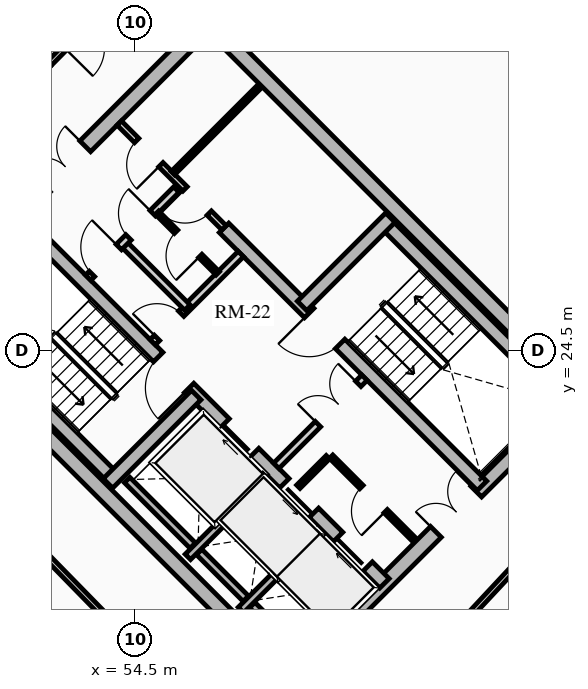
"""IFC4 building model, lengths in metres.
Left out: names, types, materials, properties, quantities, classifications, styles, units other than length and angle.
Written with IfcOpenShell. Run it as: python <this file> out.ifc"""

import sys

from ifc_helpers import new_model, si_unit, direction, frame, frame_2d, origin, place, context, subcontext, project, spatial, rectangle, extrude, source, transform, mapped, element, fill, save


model = new_model("IFC4")
c1 = context("Model", 3, precision=1e-05, world=origin(), true_north=direction((0.0, 1.0)))
c2 = subcontext(c1, "Body", "Model", "MODEL_VIEW")
j1 = project(units=[si_unit("LENGTHUNIT", "METRE"), si_unit("PLANEANGLEUNIT", "RADIAN")], contexts=[c1])
p1 = place(None, origin())
s1 = spatial("IfcSite", under=j1, at=p1, CompositionType="ELEMENT")
p2 = place(p1, origin())
s2 = spatial("IfcBuilding", under=s1, at=p2, CompositionType="ELEMENT")
p3 = place(p2, frame((0.0, 0.0, 219.94)))
s3 = spatial("IfcBuildingStorey", under=s2, at=p3, CompositionType="ELEMENT", Elevation=219.94)
for number, where, z_axis, x_axis in (
    (1, (58.702, 15.732, 0.0), (0.0, 0.0, 1.0), (-0.707, 0.707, 0.0)),
    (2, (66.268, 23.298, 0.0), (0.0, 0.0, 1.0), (-0.707, 0.707, 0.0)),
):
    element("IfcWall", number, at=place(p3, frame(where, z_axis=z_axis, x_axis=x_axis)), inside=s3, PredefinedType="SHEAR", context=c2, shape_type="SweptSolid", body=[
        extrude(rectangle(XDim=14.1, YDim=0.4, at=frame_2d((7.05, 0.0))), origin(), (0.0, 0.0, 1.0), 2.91),
    ])
p4 = place(p3, frame((58.561, 15.873, 0.0), z_axis=(0.0, 0.0, 1.0), x_axis=(0.707106781187, 0.707106781187, 0.0)))
e3 = element("IfcWall", 3, at=p4, inside=s3, PredefinedType="SHEAR", context=c2, shape_type="SweptSolid", body=[
    extrude(rectangle(XDim=10.7, YDim=0.4, at=frame_2d((5.35, 0.0))), origin(), (0.0, 0.0, 1.0), 2.91),
])
m1 = source(origin(), c2, "Body", "SweptSolid", [
    extrude(rectangle(XDim=1.5, YDim=2.02, at=frame_2d((0.75, 1.01))), frame((0.0, 0.21, 0.0), z_axis=(0.0, -1.0, 0.0), x_axis=(1.0, 0.0, 0.0)), (0.0, 0.0, 1.0), 0.42),
])
p5 = place(p4, frame((5.45, 0.0, 0.0)))
e4 = element("IfcOpeningElement", 4, at=p5, cuts=e3, PredefinedType="OPENING", context=c2, shape_type="MappedRepresentation", body=[
    mapped(m1, transform((0.0, 0.0, 0.0), x_axis=(1.0, 0.0, 0.0), y_axis=(0.0, 1.0, 0.0), z_axis=(0.0, 0.0, 1.0), scale=1.0)),
])
p6 = place(p3, frame((48.873, 25.561, 0.0), z_axis=(0.0, 0.0, 1.0), x_axis=(0.707106781187, 0.707106781187, 0.0)))
e5 = element("IfcWall", 5, at=p6, inside=s3, PredefinedType="SHEAR", context=c2, shape_type="SweptSolid", body=[
    extrude(rectangle(XDim=10.7, YDim=0.4, at=frame_2d((5.35, 0.0))), origin(), (0.0, 0.0, 1.0), 2.91),
])
p7 = place(p6, frame((4.6, 0.0, 0.0)))
e6 = element("IfcOpeningElement", 6, at=p7, cuts=e5, PredefinedType="OPENING", context=c2, shape_type="MappedRepresentation", body=[
    mapped(m1, transform((0.0, 0.0, 0.0), x_axis=(1.0, 0.0, 0.0), y_axis=(0.0, 1.0, 0.0), z_axis=(0.0, 0.0, 1.0), scale=1.0)),
])
p8 = place(p3, frame((61.06, 18.373, 0.0), z_axis=(0.0, 0.0, 1.0), x_axis=(-0.707106781187, 0.707106781187, 0.0)))
e7 = element("IfcWall", 7, at=p8, inside=s3, PredefinedType="SHEAR", context=c2, shape_type="SweptSolid", body=[
    extrude(rectangle(XDim=13.7, YDim=0.35, at=frame_2d((6.85, 0.0))), origin(), (0.0, 0.0, 1.0), 2.91),
])
m2 = source(origin(), c2, "Body", "SweptSolid", [
    extrude(rectangle(XDim=1.1, YDim=2.015, at=frame_2d((0.55, 1.007))), frame((0.0, 0.185, 0.0), z_axis=(0.0, -1.0, 0.0), x_axis=(1.0, 0.0, 0.0)), (0.0, 0.0, 1.0), 0.37),
])
p9 = place(p8, frame((4.85, 0.0, 0.0)))
e8 = element("IfcOpeningElement", 8, at=p9, cuts=e7, PredefinedType="OPENING", context=c2, shape_type="MappedRepresentation", body=[
    mapped(m2, transform((0.0, 0.0, 0.0), x_axis=(1.0, 0.0, 0.0), y_axis=(0.0, 1.0, 0.0), z_axis=(0.0, 0.0, 1.0), scale=1.0)),
])
p10 = place(p8, frame((0.625, 0.0, 0.0)))
e9 = element("IfcOpeningElement", 9, at=p10, cuts=e7, PredefinedType="OPENING", context=c2, shape_type="MappedRepresentation", body=[
    mapped(m2, transform((0.0, 0.0, 0.0), x_axis=(1.0, 0.0, 0.0), y_axis=(0.0, 1.0, 0.0), z_axis=(0.0, 0.0, 1.0), scale=1.0)),
])
p11 = place(p8, frame((2.625, 0.0, 0.0)))
e10 = element("IfcOpeningElement", 10, at=p11, cuts=e7, PredefinedType="OPENING", context=c2, shape_type="MappedRepresentation", body=[
    mapped(m2, transform((0.0, 0.0, 0.0), x_axis=(1.0, 0.0, 0.0), y_axis=(0.0, 1.0, 0.0), z_axis=(0.0, 0.0, 1.0), scale=1.0)),
])
m3 = source(origin(), c2, "Body", "SweptSolid", [
    extrude(rectangle(XDim=1.15, YDim=2.02, at=frame_2d((0.575, 1.01))), frame((0.0, 0.185, 0.0), z_axis=(0.0, -1.0, 0.0), x_axis=(1.0, 0.0, 0.0)), (0.0, 0.0, 1.0), 0.37),
])
p12 = place(p8, frame((7.27, 0.0, 0.0)))
e11 = element("IfcOpeningElement", 11, at=p12, cuts=e7, PredefinedType="OPENING", context=c2, shape_type="MappedRepresentation", body=[
    mapped(m3, transform((0.0, 0.0, 0.0), x_axis=(1.0, 0.0, 0.0), y_axis=(0.0, 1.0, 0.0), z_axis=(0.0, 0.0, 1.0), scale=1.0)),
])
p13 = place(p3, frame((63.627, 20.94, 0.0), z_axis=(0.0, 0.0, 1.0), x_axis=(-0.707119496762, 0.707094065383, 0.0)))
e12 = element("IfcWall", 12, at=p13, inside=s3, PredefinedType="SHEAR", context=c2, shape_type="SweptSolid", body=[
    extrude(rectangle(XDim=9.6, YDim=0.35, at=frame_2d((4.8, 0.0))), origin(), (0.0, 0.0, 1.0), 2.91),
])
p14 = place(p13, frame((5.28, 0.0, 0.0)))
e13 = element("IfcOpeningElement", 13, at=p14, cuts=e12, PredefinedType="OPENING", context=c2, shape_type="MappedRepresentation", body=[
    mapped(m3, transform((0.0, 0.0, 0.0), x_axis=(1.0, 0.0, 0.0), y_axis=(0.0, 1.0, 0.0), z_axis=(0.0, 0.0, 1.0), scale=1.0)),
])
p15 = place(p3, frame((53.922, 21.141, 0.0), z_axis=(0.0, 0.0, 1.0), x_axis=(-0.707106781187, 0.707106781187, 0.0)))
e14 = element("IfcWall", 14, at=p15, inside=s3, PredefinedType="SHEAR", context=c2, shape_type="SweptSolid", body=[
    extrude(rectangle(XDim=6.695, YDim=0.35, at=frame_2d((3.348, 0.0))), origin(), (0.0, 0.0, 1.0), 2.91),
])
p16 = place(p3, frame((53.784, 21.003, 0.0), z_axis=(0.0, 0.0, 1.0), x_axis=(0.707106781187, 0.707106781187, 0.0)))
e15 = element("IfcWall", 15, at=p16, inside=s3, PredefinedType="SHEAR", context=c2, shape_type="SweptSolid", body=[
    extrude(rectangle(XDim=3.285, YDim=0.35, at=frame_2d((1.643, 0.0))), origin(), (0.0, 0.0, 1.0), 2.91),
])
p17 = place(p3, frame((65.812, 23.125, 0.0), z_axis=(0.0, 0.0, 1.0), x_axis=(-0.707106781187, 0.707106781187, 0.0)))
e16 = element("IfcWall", 16, at=p17, inside=s3, PredefinedType="SHEAR", context=c2, shape_type="SweptSolid", body=[
    extrude(rectangle(XDim=6.695, YDim=0.35, at=frame_2d((3.348, 0.0))), origin(), (0.0, 0.0, 1.0), 2.91),
])
p18 = place(p3, frame((58.893, 25.674, 0.0), z_axis=(0.0, 0.0, 1.0), x_axis=(0.707106781187, 0.707106781187, 0.0)))
e17 = element("IfcWall", 17, at=p18, inside=s3, PredefinedType="SHEAR", context=c2, shape_type="SweptSolid", body=[
    extrude(rectangle(XDim=3.285, YDim=0.35, at=frame_2d((1.643, 0.0))), origin(), (0.0, 0.0, 1.0), 2.91),
])
p19 = place(p3, frame((55.888, 19.069, 0.0), z_axis=(0.0, 0.0, 1.0), x_axis=(0.707106781187, 0.707106781187, 0.0)))
e18 = element("IfcWall", 18, at=p19, inside=s3, PredefinedType="SHEAR", context=c2, shape_type="SweptSolid", body=[
    extrude(rectangle(XDim=2.97, YDim=0.2, at=frame_2d((1.485, 0.0))), origin(), (0.0, 0.0, 1.0), 2.91),
])
p20 = place(p3, frame((56.015, 19.366, 0.0), z_axis=(0.0, 0.0, 1.0), x_axis=(-0.707106781187, 0.707106781187, 0.0)))
e19 = element("IfcWall", 19, at=p20, inside=s3, PredefinedType="SHEAR", context=c2, shape_type="SweptSolid", body=[
    extrude(rectangle(XDim=2.44, YDim=0.2, at=frame_2d((1.22, 0.0))), origin(), (0.0, 0.0, 1.0), 2.91),
])
p21 = place(p3, frame((57.284, 17.673, 0.0), z_axis=(0.0, 0.0, 1.0), x_axis=(0.707147878904, 0.70706568108, 0.0)))
e20 = element("IfcWall", 20, at=p21, inside=s3, PredefinedType="SHEAR", context=c2, shape_type="SweptSolid", body=[
    extrude(rectangle(XDim=2.97, YDim=0.2, at=frame_2d((1.485, 0.0))), origin(), (0.0, 0.0, 1.0), 2.91),
])
p22 = place(p3, frame((57.412, 17.97, 0.0), z_axis=(0.0, 0.0, 1.0), x_axis=(-0.707106781187, 0.707106781187, 0.0)))
e21 = element("IfcWall", 21, at=p22, inside=s3, PredefinedType="SHEAR", context=c2, shape_type="SweptSolid", body=[
    extrude(rectangle(XDim=1.735, YDim=0.2, at=frame_2d((0.867, 0.0))), origin(), (0.0, 0.0, 1.0), 2.91),
])
p23 = place(p3, frame((58.737, 16.644, 0.0), z_axis=(0.0, 0.0, 1.0), x_axis=(-0.707032117043, 0.707181437447, 0.0)))
e22 = element("IfcWall", 22, at=p23, inside=s3, PredefinedType="SHEAR", context=c2, shape_type="SweptSolid", body=[
    extrude(rectangle(XDim=1.635, YDim=0.2, at=frame_2d((0.817, 0.0))), origin(), (0.0, 0.0, 1.0), 2.91),
])
p24 = place(p3, frame((58.214, 21.467, 0.0), z_axis=(0.0, 0.0, 1.0), x_axis=(0.707106781187, 0.707106781187, 0.0)))
e23 = element("IfcWall", 23, at=p24, inside=s3, PredefinedType="PARTITIONING", context=c2, shape_type="SweptSolid", body=[
    extrude(rectangle(XDim=3.28, YDim=0.2, at=frame_2d((1.64, 0.0))), origin(), (0.0, 0.0, 1.0), 2.685),
])
m4 = source(origin(), c2, "Body", "SweptSolid", [
    extrude(rectangle(XDim=1.5, YDim=2.02, at=frame_2d((0.75, 1.01))), frame((0.0, 0.11, 0.0), z_axis=(0.0, -1.0, 0.0), x_axis=(1.0, 0.0, 0.0)), (0.0, 0.0, 1.0), 0.22),
])
p25 = place(p24, frame((1.55, 0.0, 0.0)))
e24 = element("IfcOpeningElement", 24, at=p25, cuts=e23, PredefinedType="OPENING", context=c2, shape_type="MappedRepresentation", body=[
    mapped(m4, transform((0.0, 0.0, 0.0), x_axis=(1.0, 0.0, 0.0), y_axis=(0.0, 1.0, 0.0), z_axis=(0.0, 0.0, 1.0), scale=1.0)),
])
p26 = place(p3, frame((54.961, 24.719, 0.0), z_axis=(0.0, 0.0, 1.0), x_axis=(0.707106781187, 0.707106781187, 0.0)))
e25 = element("IfcWall", 25, at=p26, inside=s3, PredefinedType="PARTITIONING", context=c2, shape_type="SweptSolid", body=[
    extrude(rectangle(XDim=3.28, YDim=0.2, at=frame_2d((1.64, 0.0))), origin(), (0.0, 0.0, 1.0), 2.685),
])
m5 = source(origin(), c2, "Body", "SweptSolid", [
    extrude(rectangle(XDim=0.9, YDim=2.005, at=frame_2d((0.45, 1.002))), frame((0.0, 0.11, 0.0), z_axis=(0.0, -1.0, 0.0), x_axis=(1.0, 0.0, 0.0)), (0.0, 0.0, 1.0), 0.22),
])
p27 = place(p26, frame((0.16, 0.0, 0.0)))
e26 = element("IfcOpeningElement", 26, at=p27, cuts=e25, PredefinedType="OPENING", context=c2, shape_type="MappedRepresentation", body=[
    mapped(m5, transform((0.0, 0.0, 0.0), x_axis=(1.0, 0.0, 0.0), y_axis=(0.0, 1.0, 0.0), z_axis=(0.0, 0.0, 1.0), scale=1.0)),
])
p28 = place(p3, frame((55.874, 25.631, 0.0), z_axis=(0.0, 0.0, 1.0), x_axis=(-0.707157639372, 0.707055919343, 0.0)))
e27 = element("IfcWall", 27, at=p28, inside=s3, PredefinedType="PARTITIONING", context=c2, shape_type="SweptSolid", body=[
    extrude(rectangle(XDim=2.4, YDim=0.2, at=frame_2d((1.2, 0.0))), origin(), (0.0, 0.0, 1.0), 2.685),
])
p29 = place(p3, frame((53.264, 26.416, 0.0), z_axis=(0.0, 0.0, 1.0), x_axis=(0.707106781187, 0.707106781187, 0.0)))
e28 = element("IfcWall", 28, at=p29, inside=s3, PredefinedType="PARTITIONING", context=c2, shape_type="SweptSolid", body=[
    extrude(rectangle(XDim=3.28, YDim=0.2, at=frame_2d((1.64, 0.0))), origin(), (0.0, 0.0, 1.0), 2.685),
])
m6 = source(origin(), c2, "Body", "SweptSolid", [
    extrude(rectangle(XDim=1.0, YDim=2.015, at=frame_2d((0.5, 1.007))), frame((0.0, 0.11, 0.0), z_axis=(0.0, -1.0, 0.0), x_axis=(1.0, 0.0, 0.0)), (0.0, 0.0, 1.0), 0.22),
])
p30 = place(p29, frame((0.14, 0.0, 0.0)))
e29 = element("IfcOpeningElement", 29, at=p30, cuts=e28, PredefinedType="OPENING", context=c2, shape_type="MappedRepresentation", body=[
    mapped(m6, transform((0.0, 0.0, 0.0), x_axis=(1.0, 0.0, 0.0), y_axis=(0.0, 1.0, 0.0), z_axis=(0.0, 0.0, 1.0), scale=1.0)),
])
p31 = place(p29, frame((1.5, 0.0, 0.0)))
e30 = element("IfcOpeningElement", 30, at=p31, cuts=e28, PredefinedType="OPENING", context=c2, shape_type="MappedRepresentation", body=[
    mapped(m5, transform((0.0, 0.0, 0.0), x_axis=(1.0, 0.0, 0.0), y_axis=(0.0, 1.0, 0.0), z_axis=(0.0, 0.0, 1.0), scale=1.0)),
])
p32 = place(p3, frame((61.835, 19.529, 0.0), z_axis=(0.0, 0.0, 1.0), x_axis=(-0.707146413884, 0.707067146267, 0.0)))
e31 = element("IfcWall", 31, at=p32, inside=s3, PredefinedType="PARTITIONING", context=c2, shape_type="SweptSolid", body=[
    extrude(rectangle(XDim=3.08, YDim=0.125, at=frame_2d((1.54, 0.0))), origin(), (0.0, 0.0, 1.0), 2.685),
])
m7 = source(origin(), c2, "Body", "SweptSolid", [
    extrude(rectangle(XDim=0.9, YDim=2.005, at=frame_2d((0.45, 1.002))), frame((0.0, 0.073, 0.0), z_axis=(0.0, -1.0, 0.0), x_axis=(1.0, 0.0, 0.0)), (0.0, 0.0, 1.0), 0.145),
])
p33 = place(p32, frame((1.05, 0.0, 0.0)))
e32 = element("IfcOpeningElement", 32, at=p33, cuts=e31, PredefinedType="OPENING", context=c2, shape_type="MappedRepresentation", body=[
    mapped(m7, transform((0.0, 0.0, 0.0), x_axis=(1.0, 0.0, 0.0), y_axis=(0.0, 1.0, 0.0), z_axis=(0.0, 0.0, 1.0), scale=1.0)),
])
p34 = place(p3, frame((58.794, 20.915, 0.0), z_axis=(0.0, 0.0, 1.0), x_axis=(0.707106781187, 0.707106781187, 0.0)))
e33 = element("IfcWall", 33, at=p34, inside=s3, PredefinedType="PARTITIONING", context=c2, shape_type="SweptSolid", body=[
    extrude(rectangle(XDim=1.1, YDim=0.125, at=frame_2d((0.55, 0.0))), origin(), (0.0, 0.0, 1.0), 2.685),
])
p35 = place(p3, frame((56.673, 26.529, 0.0), z_axis=(0.0, 0.0, 1.0), x_axis=(-0.707052764397, 0.70716079385, 0.0)))
e34 = element("IfcWall", 34, at=p35, inside=s3, PredefinedType="PARTITIONING", context=c2, shape_type="SweptSolid", body=[
    extrude(rectangle(XDim=2.26, YDim=0.125, at=frame_2d((1.13, 0.0))), origin(), (0.0, 0.0, 1.0), 2.685),
])
p36 = place(p35, frame((0.65, 0.0, 0.0)))
e35 = element("IfcOpeningElement", 35, at=p36, cuts=e34, PredefinedType="OPENING", context=c2, shape_type="MappedRepresentation", body=[
    mapped(m7, transform((0.0, 0.0, 0.0), x_axis=(1.0, 0.0, 0.0), y_axis=(0.0, 1.0, 0.0), z_axis=(0.0, 0.0, 1.0), scale=1.0)),
])
p37 = place(p3, frame((56.839, 27.728, 0.0), z_axis=(0.0, 0.0, 1.0), x_axis=(-0.707106781187, 0.707106781187, 0.0)))
e36 = element("IfcWall", 36, at=p37, inside=s3, PredefinedType="PARTITIONING", context=c2, shape_type="SweptSolid", body=[
    extrude(rectangle(XDim=3.9, YDim=0.16, at=frame_2d((1.95, 0.0))), origin(), (0.0, 0.0, 1.0), 2.685),
])
m8 = source(origin(), c2, "Body", "SweptSolid", [
    extrude(rectangle(XDim=0.9, YDim=2.005, at=frame_2d((0.45, 1.002))), frame((0.0, 0.09, 0.0), z_axis=(0.0, -1.0, 0.0), x_axis=(1.0, 0.0, 0.0)), (0.0, 0.0, 1.0), 0.18),
])
p38 = place(p37, frame((0.55, 0.0, 0.0)))
e37 = element("IfcOpeningElement", 37, at=p38, cuts=e36, PredefinedType="OPENING", context=c2, shape_type="MappedRepresentation", body=[
    mapped(m8, transform((0.0, 0.0, 0.0), x_axis=(1.0, 0.0, 0.0), y_axis=(0.0, 1.0, 0.0), z_axis=(0.0, 0.0, 1.0), scale=1.0)),
])
p39 = place(p37, frame((2.35, 0.0, 0.0)))
e38 = element("IfcOpeningElement", 38, at=p39, cuts=e36, PredefinedType="OPENING", context=c2, shape_type="MappedRepresentation", body=[
    mapped(m8, transform((0.0, 0.0, 0.0), x_axis=(1.0, 0.0, 0.0), y_axis=(0.0, 1.0, 0.0), z_axis=(0.0, 0.0, 1.0), scale=1.0)),
])
p40 = place(p3, frame((55.492, 29.167, 0.0), z_axis=(0.0, 0.0, 1.0), x_axis=(0.707144688645, 0.707068871696, 0.0)))
e39 = element("IfcWall", 39, at=p40, inside=s3, PredefinedType="PARTITIONING", context=c2, shape_type="SweptSolid", body=[
    extrude(rectangle(XDim=3.22, YDim=0.125, at=frame_2d((1.61, 0.0))), origin(), (0.0, 0.0, 1.0), 2.222),
])
p41 = place(p3, frame((54.506, 34.344, 0.0), z_axis=(0.0, 0.0, 1.0), x_axis=(-0.703053402247, -0.711137056824, 0.0)))
e40 = element("IfcWall", 40, at=p41, inside=s3, PredefinedType="PARTITIONING", context=c2, shape_type="SweptSolid", body=[
    extrude(rectangle(XDim=3.262, YDim=0.15, at=frame_2d((1.631, 0.0))), origin(), (0.0, 0.0, 1.0), 2.322),
])
m9 = source(origin(), c2, "Body", "SweptSolid", [
    extrude(rectangle(XDim=1.05, YDim=2.015, at=frame_2d((0.525, 1.007))), frame((0.0, 0.085, 0.0), z_axis=(0.0, -1.0, 0.0), x_axis=(1.0, 0.0, 0.0)), (0.0, 0.0, 1.0), 0.17),
])
p42 = place(p41, frame((1.599, 0.0, 0.0)))
e41 = element("IfcOpeningElement", 41, at=p42, cuts=e40, PredefinedType="OPENING", context=c2, shape_type="MappedRepresentation", body=[
    mapped(m9, transform((0.0, 0.0, 0.0), x_axis=(1.0, 0.0, 0.0), y_axis=(0.0, 1.0, 0.0), z_axis=(0.0, 0.0, 1.0), scale=1.0)),
])
p43 = place(p3, frame((52.126, 19.126, 0.0), z_axis=(0.0, 0.0, 1.0), x_axis=(0.698979087027, -0.715142108884, 0.0)))
e42 = element("IfcWall", 42, at=p43, inside=s3, PredefinedType="PARTITIONING", context=c2, shape_type="SweptSolid", body=[
    extrude(rectangle(XDim=5.966, YDim=0.15, at=frame_2d((2.983, 0.0))), origin(), (0.0, 0.0, 1.0), 2.322),
])
p44 = place(p43, frame((2.458, 0.0, 0.0)))
e43 = element("IfcOpeningElement", 43, at=p44, cuts=e42, PredefinedType="OPENING", context=c2, shape_type="MappedRepresentation", body=[
    mapped(m9, transform((0.0, 0.0, 0.0), x_axis=(1.0, 0.0, 0.0), y_axis=(0.0, 1.0, 0.0), z_axis=(0.0, 0.0, 1.0), scale=1.0)),
])
p45 = place(p3, frame((62.736, 16.924, 0.0), z_axis=(0.0, 0.0, 1.0), x_axis=(0.681946700833, 0.731401871219, 0.0)))
e44 = element("IfcWall", 44, at=p45, inside=s3, PredefinedType="PARTITIONING", context=c2, shape_type="SweptSolid", body=[
    extrude(rectangle(XDim=6.393, YDim=0.15, at=frame_2d((3.196, 0.0))), origin(), (0.0, 0.0, 1.0), 2.255),
])
p46 = place(p3, frame((51.134, 18.134, 0.0), z_axis=(0.0, 0.0, 1.0), x_axis=(0.722450775654, -0.691422357721, 0.0)))
e45 = element("IfcWall", 45, at=p46, inside=s3, PredefinedType="PARTITIONING", context=c2, shape_type="SweptSolid", body=[
    extrude(rectangle(XDim=5.634, YDim=0.125, at=frame_2d((2.817, 0.0))), origin(), (0.0, 0.0, 1.0), 2.322),
])
m10 = source(origin(), c2, "Body", "SweptSolid", [
    extrude(rectangle(XDim=1.1, YDim=2.015, at=frame_2d((0.55, 1.007))), frame((0.0, 0.025, 0.0), z_axis=(0.0, -1.0, 0.0), x_axis=(1.0, 0.0, 0.0)), (0.0, 0.0, 1.0), 0.05),
])
p47 = place(p9, origin())
e46 = element("IfcDoor", 46, at=p47, inside=s3, OperationType="SLIDING_TO_RIGHT", PredefinedType="DOOR", context=c2, shape_type="MappedRepresentation", body=[
    mapped(m10, transform((0.0, 0.0, 0.0), x_axis=(1.0, 0.0, 0.0), y_axis=(0.0, 1.0, 0.0), z_axis=(0.0, 0.0, 1.0), scale=1.0)),
])
fill(e8, e46)
p48 = place(p10, origin())
e47 = element("IfcDoor", 47, at=p48, inside=s3, OperationType="SLIDING_TO_RIGHT", PredefinedType="DOOR", context=c2, shape_type="MappedRepresentation", body=[
    mapped(m10, transform((0.0, 0.0, 0.0), x_axis=(1.0, 0.0, 0.0), y_axis=(0.0, 1.0, 0.0), z_axis=(0.0, 0.0, 1.0), scale=1.0)),
])
fill(e9, e47)
p49 = place(p11, origin())
e48 = element("IfcDoor", 48, at=p49, inside=s3, OperationType="SLIDING_TO_LEFT", PredefinedType="DOOR", context=c2, shape_type="MappedRepresentation", body=[
    mapped(m10, transform((0.0, 0.0, 0.0), x_axis=(1.0, 0.0, 0.0), y_axis=(0.0, 1.0, 0.0), z_axis=(0.0, 0.0, 1.0), scale=1.0)),
])
fill(e10, e48)
m11 = source(origin(), c2, "Body", "SweptSolid", [
    extrude(rectangle(XDim=1.15, YDim=2.02, at=frame_2d((0.575, 1.01))), frame((0.0, 0.025, 0.0), z_axis=(0.0, -1.0, 0.0), x_axis=(1.0, 0.0, 0.0)), (0.0, 0.0, 1.0), 0.05),
])
p50 = place(p12, origin())
e49 = element("IfcDoor", 49, at=p50, inside=s3, OperationType="SINGLE_SWING_LEFT", PredefinedType="DOOR", context=c2, shape_type="MappedRepresentation", body=[
    mapped(m11, transform((0.0, 0.0, 0.0), x_axis=(1.0, 0.0, 0.0), y_axis=(0.0, 1.0, 0.0), z_axis=(0.0, 0.0, 1.0), scale=1.0)),
])
fill(e11, e49)
p51 = place(p14, origin())
e50 = element("IfcDoor", 50, at=p51, inside=s3, OperationType="SINGLE_SWING_RIGHT", PredefinedType="DOOR", context=c2, shape_type="MappedRepresentation", body=[
    mapped(m11, transform((0.0, 0.0, 0.0), x_axis=(1.0, 0.0, 0.0), y_axis=(0.0, 1.0, 0.0), z_axis=(0.0, 0.0, 1.0), scale=1.0)),
])
fill(e13, e50)
m12 = source(origin(), c2, "Body", "SweptSolid", [
    extrude(rectangle(XDim=1.5, YDim=2.02, at=frame_2d((0.75, 1.01))), frame((0.0, 0.025, 0.0), z_axis=(0.0, -1.0, 0.0), x_axis=(1.0, 0.0, 0.0)), (0.0, 0.0, 1.0), 0.05),
])
p52 = place(p7, origin())
e51 = element("IfcDoor", 51, at=p52, inside=s3, OperationType="DOUBLE_DOOR_SINGLE_SWING", PredefinedType="DOOR", context=c2, shape_type="MappedRepresentation", body=[
    mapped(m12, transform((0.0, 0.0, 0.0), x_axis=(1.0, 0.0, 0.0), y_axis=(0.0, 1.0, 0.0), z_axis=(0.0, 0.0, 1.0), scale=1.0)),
])
fill(e6, e51)
p53 = place(p5, origin())
e52 = element("IfcDoor", 52, at=p53, inside=s3, OperationType="DOUBLE_DOOR_SINGLE_SWING", PredefinedType="DOOR", context=c2, shape_type="MappedRepresentation", body=[
    mapped(m12, transform((0.0, 0.0, 0.0), x_axis=(1.0, 0.0, 0.0), y_axis=(0.0, 1.0, 0.0), z_axis=(0.0, 0.0, 1.0), scale=1.0)),
])
fill(e4, e52)
p54 = place(p25, origin())
e53 = element("IfcDoor", 53, at=p54, inside=s3, OperationType="DOUBLE_DOOR_SINGLE_SWING", PredefinedType="DOOR", context=c2, shape_type="MappedRepresentation", body=[
    mapped(m12, transform((0.0, 0.0, 0.0), x_axis=(1.0, 0.0, 0.0), y_axis=(0.0, 1.0, 0.0), z_axis=(0.0, 0.0, 1.0), scale=1.0)),
])
fill(e24, e53)
m13 = source(origin(), c2, "Body", "SweptSolid", [
    extrude(rectangle(XDim=0.9, YDim=2.005, at=frame_2d((0.45, 1.002))), frame((0.0, 0.025, 0.0), z_axis=(0.0, -1.0, 0.0), x_axis=(1.0, 0.0, 0.0)), (0.0, 0.0, 1.0), 0.05),
])
p55 = place(p27, origin())
e54 = element("IfcDoor", 54, at=p55, inside=s3, OperationType="SINGLE_SWING_LEFT", PredefinedType="DOOR", context=c2, shape_type="MappedRepresentation", body=[
    mapped(m13, transform((0.0, 0.0, 0.0), x_axis=(1.0, 0.0, 0.0), y_axis=(0.0, 1.0, 0.0), z_axis=(0.0, 0.0, 1.0), scale=1.0)),
])
fill(e26, e54)
m14 = source(origin(), c2, "Body", "SweptSolid", [
    extrude(rectangle(XDim=1.0, YDim=2.015, at=frame_2d((0.5, 1.007))), frame((0.0, 0.025, 0.0), z_axis=(0.0, -1.0, 0.0), x_axis=(1.0, 0.0, 0.0)), (0.0, 0.0, 1.0), 0.05),
])
p56 = place(p30, origin())
e55 = element("IfcDoor", 55, at=p56, inside=s3, OperationType="SINGLE_SWING_RIGHT", PredefinedType="DOOR", context=c2, shape_type="MappedRepresentation", body=[
    mapped(m14, transform((0.0, 0.0, 0.0), x_axis=(1.0, 0.0, 0.0), y_axis=(0.0, 1.0, 0.0), z_axis=(0.0, 0.0, 1.0), scale=1.0)),
])
fill(e29, e55)
p57 = place(p33, origin())
e56 = element("IfcDoor", 56, at=p57, inside=s3, OperationType="SINGLE_SWING_LEFT", PredefinedType="DOOR", context=c2, shape_type="MappedRepresentation", body=[
    mapped(m13, transform((0.0, 0.0, 0.0), x_axis=(1.0, 0.0, 0.0), y_axis=(0.0, 1.0, 0.0), z_axis=(0.0, 0.0, 1.0), scale=1.0)),
])
fill(e32, e56)
p58 = place(p31, origin())
e57 = element("IfcDoor", 57, at=p58, inside=s3, OperationType="SINGLE_SWING_RIGHT", PredefinedType="DOOR", context=c2, shape_type="MappedRepresentation", body=[
    mapped(m13, transform((0.0, 0.0, 0.0), x_axis=(1.0, 0.0, 0.0), y_axis=(0.0, 1.0, 0.0), z_axis=(0.0, 0.0, 1.0), scale=1.0)),
])
fill(e30, e57)
p59 = place(p36, origin())
e58 = element("IfcDoor", 58, at=p59, inside=s3, OperationType="SINGLE_SWING_LEFT", PredefinedType="DOOR", context=c2, shape_type="MappedRepresentation", body=[
    mapped(m13, transform((0.0, 0.0, 0.0), x_axis=(1.0, 0.0, 0.0), y_axis=(0.0, 1.0, 0.0), z_axis=(0.0, 0.0, 1.0), scale=1.0)),
])
fill(e35, e58)
p60 = place(p38, origin())
e59 = element("IfcDoor", 59, at=p60, inside=s3, OperationType="SINGLE_SWING_RIGHT", PredefinedType="DOOR", context=c2, shape_type="MappedRepresentation", body=[
    mapped(m13, transform((0.0, 0.0, 0.0), x_axis=(1.0, 0.0, 0.0), y_axis=(0.0, 1.0, 0.0), z_axis=(0.0, 0.0, 1.0), scale=1.0)),
])
fill(e37, e59)
p61 = place(p39, origin())
e60 = element("IfcDoor", 60, at=p61, inside=s3, OperationType="SINGLE_SWING_LEFT", PredefinedType="DOOR", context=c2, shape_type="MappedRepresentation", body=[
    mapped(m13, transform((0.0, 0.0, 0.0), x_axis=(1.0, 0.0, 0.0), y_axis=(0.0, 1.0, 0.0), z_axis=(0.0, 0.0, 1.0), scale=1.0)),
])
fill(e38, e60)
save(model, sys.argv[1])
